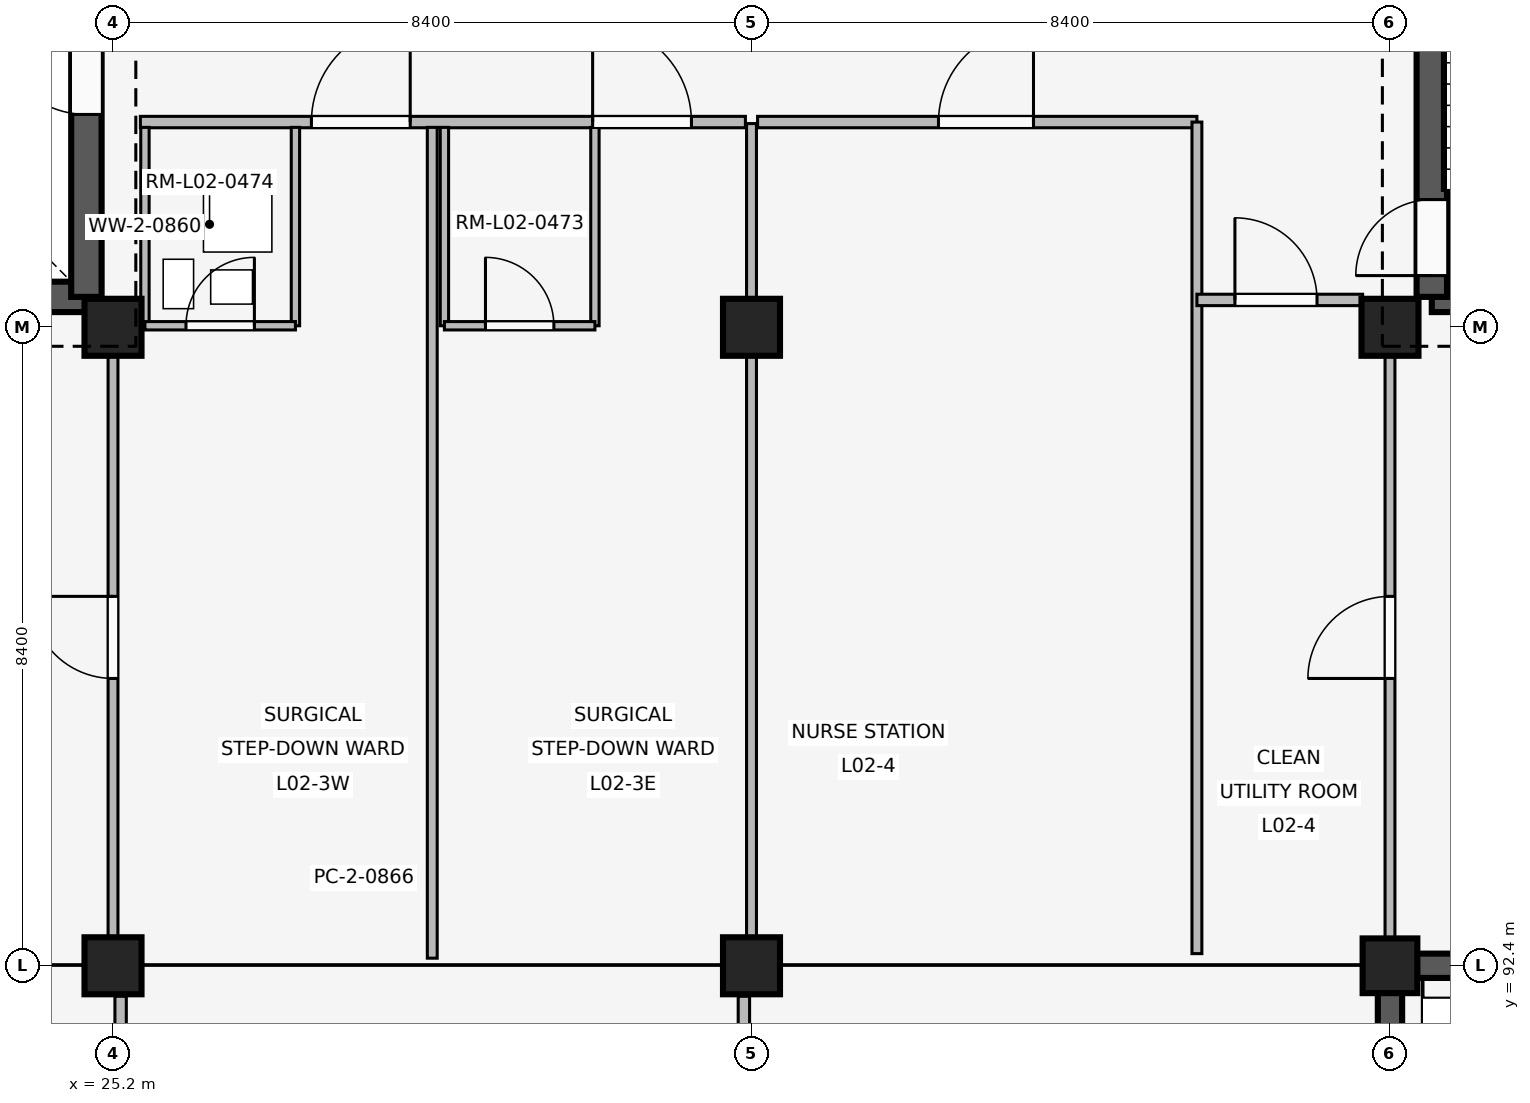
"""IFC4 building model, lengths in metres.
Left out: names, types, materials, properties, quantities, classifications, styles, units other than length and angle.
Written with IfcOpenShell. Run it as: python <this file> out.ifc"""

import sys

from ifc_helpers import new_model, si_unit, direction, frame, frame_2d, origin, origin_2d, place, context, subcontext, project, spatial, rectangle, extrude, element, fill, save


model = new_model("IFC4")
c1 = context("Model", 3, precision=1e-05, world=origin(), true_north=direction((0.0, 1.0)))
c2 = subcontext(c1, "Body", "Model", "MODEL_VIEW")
j1 = project(units=[si_unit("LENGTHUNIT", "METRE"), si_unit("PLANEANGLEUNIT", "RADIAN")], contexts=[c1])
p1 = place(None, origin())
s1 = spatial("IfcSite", under=j1, at=p1, CompositionType="ELEMENT")
p2 = place(p1, origin())
s2 = spatial("IfcBuilding", under=s1, at=p2, CompositionType="ELEMENT")
p3 = place(p2, frame((0.0, 0.0, 8.1)))
s3 = spatial("IfcBuildingStorey", under=s2, at=p3, CompositionType="ELEMENT", Elevation=8.1)
for number, where, z_axis, x_axis in (
    (1, (25.2, 92.4, 0.0), (0.0, 0.0, 1.0), (1.0, 0.0, 0.0)),
    (2, (25.2, 100.8, 0.0), (0.0, 0.0, 1.0), (1.0, 0.0, 0.0)),
    (3, (33.6, 92.4, 0.0), (0.0, 0.0, 1.0), (1.0, 0.0, 0.0)),
    (4, (33.6, 100.8, 0.0), (0.0, 0.0, 1.0), (1.0, 0.0, 0.0)),
):
    element("IfcColumn", number, at=place(p3, frame(where, z_axis=z_axis, x_axis=x_axis)), inside=s3, PredefinedType="COLUMN", context=c2, shape_type="SweptSolid", body=[
        extrude(rectangle(XDim=0.75, YDim=0.75, at=origin_2d()), origin(), (0.0, 0.0, 1.0), 4.8),
    ])
p4 = place(p3, frame((42.0, 92.4, 0.0), z_axis=(0.0, 0.0, 1.0), x_axis=(1.0, 0.0, 0.0)))
e5 = element("IfcColumn", 5, at=p4, inside=s3, PredefinedType="COLUMN", context=c2, shape_type="SweptSolid", body=[
    extrude(rectangle(XDim=0.72, YDim=0.72, at=origin_2d()), origin(), (0.0, 0.0, 1.0), 4.8),
])
p5 = place(p3, frame((42.0, 100.8, 0.0), z_axis=(0.0, 0.0, 1.0), x_axis=(1.0, 0.0, 0.0)))
e6 = element("IfcColumn", 6, at=p5, inside=s3, PredefinedType="COLUMN", context=c2, shape_type="SweptSolid", body=[
    extrude(rectangle(XDim=0.75, YDim=0.75, at=origin_2d()), origin(), (0.0, 0.0, 1.0), 4.8),
])
p6 = place(p3, frame((42.0, 92.045, 0.0), z_axis=(0.0, 0.0, 1.0), x_axis=(0.0, -1.0, 0.0)))
e7 = element("IfcWall", 7, at=p6, inside=s3, PredefinedType="SOLIDWALL", context=c2, shape_type="SweptSolid", body=[
    extrude(rectangle(XDim=7.69, YDim=0.32, at=frame_2d((3.845, 0.0))), origin(), (0.0, 0.0, 1.0), 3.86),
])
p7 = place(p6, frame((1.069, 0.0, 0.85)))
e8 = element("IfcOpeningElement", 8, at=p7, cuts=e7, PredefinedType="OPENING", context=c2, shape_type="SweptSolid", body=[
    extrude(rectangle(XDim=1.4, YDim=1.4, at=frame_2d((0.7, 0.7))), frame((0.0, 0.17, 0.0), z_axis=(0.0, -1.0, 0.0), x_axis=(1.0, 0.0, 0.0)), (0.0, 0.0, 1.0), 0.34),
])
p8 = place(p6, frame((5.221, 0.0, 0.85)))
e9 = element("IfcOpeningElement", 9, at=p8, cuts=e7, PredefinedType="OPENING", context=c2, shape_type="SweptSolid", body=[
    extrude(rectangle(XDim=1.4, YDim=1.4, at=frame_2d((0.7, 0.7))), frame((0.0, 0.17, 0.0), z_axis=(0.0, -1.0, 0.0), x_axis=(1.0, 0.0, 0.0)), (0.0, 0.0, 1.0), 0.34),
])
p9 = place(p3, frame((50.045, 92.4, 0.0), z_axis=(0.0, 0.0, 1.0), x_axis=(-1.0, 0.0, 0.0)))
e10 = element("IfcWall", 10, at=p9, inside=s3, PredefinedType="SOLIDWALL", context=c2, shape_type="SweptSolid", body=[
    extrude(rectangle(XDim=7.69, YDim=0.32, at=frame_2d((3.845, 0.0))), origin(), (0.0, 0.0, 1.0), 3.86),
])
p10 = place(p9, frame((1.089, 0.0, 0.85)))
e11 = element("IfcOpeningElement", 11, at=p10, cuts=e10, PredefinedType="OPENING", context=c2, shape_type="SweptSolid", body=[
    extrude(rectangle(XDim=1.36, YDim=1.42, at=frame_2d((0.68, 0.71))), frame((0.0, 0.17, 0.0), z_axis=(0.0, -1.0, 0.0), x_axis=(1.0, 0.0, 0.0)), (0.0, 0.0, 1.0), 0.34),
])
p11 = place(p9, frame((5.241, 0.0, 0.85)))
e12 = element("IfcOpeningElement", 12, at=p11, cuts=e10, PredefinedType="OPENING", context=c2, shape_type="SweptSolid", body=[
    extrude(rectangle(XDim=1.36, YDim=1.42, at=frame_2d((0.68, 0.71))), frame((0.0, 0.17, 0.0), z_axis=(0.0, -1.0, 0.0), x_axis=(1.0, 0.0, 0.0)), (0.0, 0.0, 1.0), 0.34),
])
p12 = place(p3, frame((42.55, 101.2, 0.0), z_axis=(0.0, 0.0, 1.0), x_axis=(1.0, 0.0, 0.0)))
e13 = element("IfcWall", 13, at=p12, inside=s3, PredefinedType="SHEAR", context=c2, shape_type="SweptSolid", body=[
    extrude(rectangle(XDim=7.5, YDim=0.4, at=frame_2d((3.75, 0.0))), origin(), (0.0, 0.0, 1.0), 4.52),
])
p13 = place(p12, frame((4.85, 0.0, 0.0)))
e14 = element("IfcOpeningElement", 14, at=p13, cuts=e13, PredefinedType="OPENING", context=c2, shape_type="SweptSolid", body=[
    extrude(rectangle(XDim=1.2, YDim=2.2, at=frame_2d((0.6, 1.1))), frame((0.0, 0.21, 0.0), z_axis=(0.0, -1.0, 0.0), x_axis=(1.0, 0.0, 0.0)), (0.0, 0.0, 1.0), 0.42),
])
p14 = place(p3, frame((42.55, 101.2, 0.0), z_axis=(0.0, 0.0, 1.0), x_axis=(0.0, 1.0, 0.0)))
e15 = element("IfcWall", 15, at=p14, inside=s3, PredefinedType="SHEAR", context=c2, shape_type="SweptSolid", body=[
    extrude(rectangle(XDim=7.55, YDim=0.4, at=frame_2d((3.775, 0.0))), origin(), (0.0, 0.0, 1.0), 4.52),
])
p15 = place(p14, frame((0.28, 0.0, 0.0)))
e16 = element("IfcOpeningElement", 16, at=p15, cuts=e15, PredefinedType="OPENING", context=c2, shape_type="SweptSolid", body=[
    extrude(rectangle(XDim=1.0, YDim=2.15, at=frame_2d((0.5, 1.075))), frame((0.0, 0.21, 0.0), z_axis=(0.0, -1.0, 0.0), x_axis=(1.0, 0.0, 0.0)), (0.0, 0.0, 1.0), 0.42),
])
p16 = place(p3, frame((17.35, 101.2, 0.0), z_axis=(0.0, 0.0, 1.0), x_axis=(1.0, 0.0, 0.0)))
e17 = element("IfcWall", 17, at=p16, inside=s3, PredefinedType="SHEAR", context=c2, shape_type="SweptSolid", body=[
    extrude(rectangle(XDim=7.5, YDim=0.4, at=frame_2d((3.75, 0.0))), origin(), (0.0, 0.0, 1.0), 4.52),
])
p17 = place(p16, frame((4.85, 0.0, 0.0)))
e18 = element("IfcOpeningElement", 18, at=p17, cuts=e17, PredefinedType="OPENING", context=c2, shape_type="SweptSolid", body=[
    extrude(rectangle(XDim=1.2, YDim=2.2, at=frame_2d((0.6, 1.1))), frame((0.0, 0.21, 0.0), z_axis=(0.0, -1.0, 0.0), x_axis=(1.0, 0.0, 0.0)), (0.0, 0.0, 1.0), 0.42),
])
p18 = place(p3, frame((24.85, 101.2, 0.0), z_axis=(0.0, 0.0, 1.0), x_axis=(0.0, 1.0, 0.0)))
e19 = element("IfcWall", 19, at=p18, inside=s3, PredefinedType="SHEAR", context=c2, shape_type="SweptSolid", body=[
    extrude(rectangle(XDim=7.55, YDim=0.4, at=frame_2d((3.775, 0.0))), origin(), (0.0, 0.0, 1.0), 4.52),
])
p19 = place(p18, frame((2.4, 0.0, 0.0)))
e20 = element("IfcOpeningElement", 20, at=p19, cuts=e19, PredefinedType="OPENING", context=c2, shape_type="SweptSolid", body=[
    extrude(rectangle(XDim=1.2, YDim=2.2, at=frame_2d((0.6, 1.1))), frame((0.0, 0.21, 0.0), z_axis=(0.0, -1.0, 0.0), x_axis=(1.0, 0.0, 0.0)), (0.0, 0.0, 1.0), 0.42),
])
p20 = place(p3, frame((25.2, 92.54, 0.0), z_axis=(0.0, 0.0, 1.0), x_axis=(0.0, 1.0, 0.0)))
e21 = element("IfcWall", 21, at=p20, inside=s3, PredefinedType="PARTITIONING", context=c2, shape_type="SweptSolid", body=[
    extrude(rectangle(XDim=8.21, YDim=0.13, at=frame_2d((4.105, 0.0))), origin(), (0.0, 0.0, 1.0), 3.84),
])
p21 = place(p20, frame((3.64, 0.0, 0.0)))
e22 = element("IfcOpeningElement", 22, at=p21, cuts=e21, PredefinedType="OPENING", context=c2, shape_type="SweptSolid", body=[
    extrude(rectangle(XDim=1.08, YDim=2.15, at=frame_2d((0.54, 1.075))), frame((0.0, 0.075, 0.0), z_axis=(0.0, -1.0, 0.0), x_axis=(1.0, 0.0, 0.0)), (0.0, 0.0, 1.0), 0.15),
])
p22 = place(p3, frame((25.56, 103.5, 0.0), z_axis=(0.0, 0.0, 1.0), x_axis=(1.0, 0.0, 0.0)))
e23 = element("IfcWall", 23, at=p22, inside=s3, PredefinedType="PARTITIONING", context=c2, shape_type="SweptSolid", body=[
    extrude(rectangle(XDim=7.96, YDim=0.15, at=frame_2d((3.98, 0.0))), origin(), (0.0, 0.0, 1.0), 3.84),
])
p23 = place(p22, frame((2.25, 0.0, 0.0)))
e24 = element("IfcOpeningElement", 24, at=p23, cuts=e23, PredefinedType="OPENING", context=c2, shape_type="SweptSolid", body=[
    extrude(rectangle(XDim=1.3, YDim=2.25, at=frame_2d((0.65, 1.125))), frame((0.0, 0.085, 0.0), z_axis=(0.0, -1.0, 0.0), x_axis=(1.0, 0.0, 0.0)), (0.0, 0.0, 1.0), 0.17),
])
p24 = place(p22, frame((5.95, 0.0, 0.0)))
e25 = element("IfcOpeningElement", 25, at=p24, cuts=e23, PredefinedType="OPENING", context=c2, shape_type="SweptSolid", body=[
    extrude(rectangle(XDim=1.3, YDim=2.25, at=frame_2d((0.65, 1.125))), frame((0.0, 0.085, 0.0), z_axis=(0.0, -1.0, 0.0), x_axis=(1.0, 0.0, 0.0)), (0.0, 0.0, 1.0), 0.17),
])
p25 = place(p3, frame((29.4, 92.5, 0.0), z_axis=(0.0, 0.0, 1.0), x_axis=(0.0, 1.0, 0.0)))
e26 = element("IfcWall", 26, at=p25, inside=s3, PredefinedType="PARTITIONING", context=c2, shape_type="SweptSolid", body=[
    extrude(rectangle(XDim=10.93, YDim=0.13, at=frame_2d((5.465, 0.0))), origin(), (0.0, 0.0, 1.0), 3.84),
])
for number, where, z_axis, x_axis in (
    (27, (25.62, 100.82, 0.0), (0.0, 0.0, 1.0), (0.0, 1.0, 0.0)),
    (28, (27.6, 100.82, 0.0), (0.0, 0.0, 1.0), (0.0, 1.0, 0.0)),
):
    element("IfcWall", number, at=place(p3, frame(where, z_axis=z_axis, x_axis=x_axis)), inside=s3, PredefinedType="PARTITIONING", context=c2, shape_type="SweptSolid", body=[
        extrude(rectangle(XDim=2.61, YDim=0.11, at=frame_2d((1.305, 0.0))), origin(), (0.0, 0.0, 1.0), 3.84),
    ])
p26 = place(p3, frame((25.62, 100.82, 0.0), z_axis=(0.0, 0.0, 1.0), x_axis=(1.0, 0.0, 0.0)))
e29 = element("IfcWall", 29, at=p26, inside=s3, PredefinedType="PARTITIONING", context=c2, shape_type="SweptSolid", body=[
    extrude(rectangle(XDim=1.98, YDim=0.11, at=frame_2d((0.99, 0.0))), origin(), (0.0, 0.0, 1.0), 3.84),
])
p27 = place(p26, frame((0.54, 0.0, 0.0)))
e30 = element("IfcOpeningElement", 30, at=p27, cuts=e29, PredefinedType="OPENING", context=c2, shape_type="SweptSolid", body=[
    extrude(rectangle(XDim=0.9, YDim=2.1, at=frame_2d((0.45, 1.05))), frame((0.0, 0.065, 0.0), z_axis=(0.0, -1.0, 0.0), x_axis=(1.0, 0.0, 0.0)), (0.0, 0.0, 1.0), 0.13),
])
for number, where, z_axis, x_axis in (
    (31, (29.56, 100.82, 0.0), (0.0, 0.0, 1.0), (0.0, 1.0, 0.0)),
    (32, (31.54, 100.82, 0.0), (0.0, 0.0, 1.0), (0.0, 1.0, 0.0)),
):
    element("IfcWall", number, at=place(p3, frame(where, z_axis=z_axis, x_axis=x_axis)), inside=s3, PredefinedType="PARTITIONING", context=c2, shape_type="SweptSolid", body=[
        extrude(rectangle(XDim=2.61, YDim=0.11, at=frame_2d((1.305, 0.0))), origin(), (0.0, 0.0, 1.0), 3.84),
    ])
p28 = place(p3, frame((29.56, 100.82, 0.0), z_axis=(0.0, 0.0, 1.0), x_axis=(1.0, 0.0, 0.0)))
e33 = element("IfcWall", 33, at=p28, inside=s3, PredefinedType="PARTITIONING", context=c2, shape_type="SweptSolid", body=[
    extrude(rectangle(XDim=1.98, YDim=0.11, at=frame_2d((0.99, 0.0))), origin(), (0.0, 0.0, 1.0), 3.84),
])
p29 = place(p28, frame((0.54, 0.0, 0.0)))
e34 = element("IfcOpeningElement", 34, at=p29, cuts=e33, PredefinedType="OPENING", context=c2, shape_type="SweptSolid", body=[
    extrude(rectangle(XDim=0.9, YDim=2.1, at=frame_2d((0.45, 1.05))), frame((0.0, 0.065, 0.0), z_axis=(0.0, -1.0, 0.0), x_axis=(1.0, 0.0, 0.0)), (0.0, 0.0, 1.0), 0.13),
])
p30 = place(p3, frame((28.05, 93.55, 0.0), z_axis=(0.0, 0.0, 1.0), x_axis=(1.0, 0.0, 0.0)))
e35 = element("IfcWall", 35, at=p30, inside=s3, PredefinedType="PLUMBINGWALL", context=c2, shape_type="SweptSolid", body=[
    extrude(rectangle(XDim=0.9, YDim=0.24, at=frame_2d((0.45, 0.0))), origin(), (0.0, 0.0, 1.0), 3.84),
])
p31 = place(p3, frame((33.6, 92.54, 0.0), z_axis=(0.0, 0.0, 1.0), x_axis=(0.0, 1.0, 0.0)))
e36 = element("IfcWall", 36, at=p31, inside=s3, PredefinedType="PARTITIONING", context=c2, shape_type="SweptSolid", body=[
    extrude(rectangle(XDim=10.94, YDim=0.13, at=frame_2d((5.47, 0.0))), origin(), (0.0, 0.0, 1.0), 3.84),
])
p32 = place(p3, frame((33.68, 103.5, 0.0), z_axis=(0.0, 0.0, 1.0), x_axis=(1.0, 0.0, 0.0)))
e37 = element("IfcWall", 37, at=p32, inside=s3, PredefinedType="PARTITIONING", context=c2, shape_type="SweptSolid", body=[
    extrude(rectangle(XDim=5.78, YDim=0.15, at=frame_2d((2.89, 0.0))), origin(), (0.0, 0.0, 1.0), 3.84),
])
p33 = place(p32, frame((2.38, 0.0, 0.0)))
e38 = element("IfcOpeningElement", 38, at=p33, cuts=e37, PredefinedType="OPENING", context=c2, shape_type="SweptSolid", body=[
    extrude(rectangle(XDim=1.25, YDim=2.2, at=frame_2d((0.625, 1.1))), frame((0.0, 0.085, 0.0), z_axis=(0.0, -1.0, 0.0), x_axis=(1.0, 0.0, 0.0)), (0.0, 0.0, 1.0), 0.17),
])
p34 = place(p3, frame((39.46, 92.56, 0.0), z_axis=(0.0, 0.0, 1.0), x_axis=(0.0, 1.0, 0.0)))
e39 = element("IfcWall", 39, at=p34, inside=s3, PredefinedType="PARTITIONING", context=c2, shape_type="SweptSolid", body=[
    extrude(rectangle(XDim=10.94, YDim=0.13, at=frame_2d((5.47, 0.0))), origin(), (0.0, 0.0, 1.0), 3.84),
])
p35 = place(p3, frame((39.46, 101.16, 0.0), z_axis=(0.0, 0.0, 1.0), x_axis=(1.0, 0.0, 0.0)))
e40 = element("IfcWall", 40, at=p35, inside=s3, PredefinedType="PARTITIONING", context=c2, shape_type="SweptSolid", body=[
    extrude(rectangle(XDim=2.18, YDim=0.15, at=frame_2d((1.09, 0.0))), origin(), (0.0, 0.0, 1.0), 3.84),
])
p36 = place(p35, frame((0.5, 0.0, 0.0)))
e41 = element("IfcOpeningElement", 41, at=p36, cuts=e40, PredefinedType="OPENING", context=c2, shape_type="SweptSolid", body=[
    extrude(rectangle(XDim=1.08, YDim=2.15, at=frame_2d((0.54, 1.075))), frame((0.0, 0.085, 0.0), z_axis=(0.0, -1.0, 0.0), x_axis=(1.0, 0.0, 0.0)), (0.0, 0.0, 1.0), 0.17),
])
p37 = place(p3, frame((42.0, 92.54, 0.0), z_axis=(0.0, 0.0, 1.0), x_axis=(0.0, 1.0, 0.0)))
e42 = element("IfcWall", 42, at=p37, inside=s3, PredefinedType="PARTITIONING", context=c2, shape_type="SweptSolid", body=[
    extrude(rectangle(XDim=8.21, YDim=0.13, at=frame_2d((4.105, 0.0))), origin(), (0.0, 0.0, 1.0), 3.84),
])
p38 = place(p37, frame((3.64, 0.0, 0.0)))
e43 = element("IfcOpeningElement", 43, at=p38, cuts=e42, PredefinedType="OPENING", context=c2, shape_type="SweptSolid", body=[
    extrude(rectangle(XDim=1.08, YDim=2.15, at=frame_2d((0.54, 1.075))), frame((0.0, 0.075, 0.0), z_axis=(0.0, -1.0, 0.0), x_axis=(1.0, 0.0, 0.0)), (0.0, 0.0, 1.0), 0.15),
])
p39 = place(p3, frame((25.3, 76.0, 0.0), z_axis=(0.0, 0.0, 1.0), x_axis=(0.0, 1.0, 0.0)))
e44 = element("IfcWall", 44, at=p39, inside=s3, PredefinedType="PARTITIONING", context=c2, shape_type="SweptSolid", body=[
    extrude(rectangle(XDim=16.0, YDim=0.15, at=frame_2d((8.0, 0.0))), origin(), (0.0, 0.0, 1.0), 3.84),
])
p40 = place(p39, frame((3.4, 0.0, 0.0)))
e45 = element("IfcOpeningElement", 45, at=p40, cuts=e44, PredefinedType="OPENING", context=c2, shape_type="SweptSolid", body=[
    extrude(rectangle(XDim=1.5, YDim=2.3, at=frame_2d((0.75, 1.15))), frame((0.0, 0.085, 0.0), z_axis=(0.0, -1.0, 0.0), x_axis=(1.0, 0.0, 0.0)), (0.0, 0.0, 1.0), 0.17),
])
p41 = place(p3, frame((33.5, 59.2, 0.0), z_axis=(0.0, 0.0, 1.0), x_axis=(0.0, 1.0, 0.0)))
e46 = element("IfcWall", 46, at=p41, inside=s3, PredefinedType="PARTITIONING", context=c2, shape_type="SweptSolid", body=[
    extrude(rectangle(XDim=32.8, YDim=0.15, at=frame_2d((16.4, 0.0))), origin(), (0.0, 0.0, 1.0), 3.84),
])
p42 = place(p41, frame((3.4, 0.0, 0.0)))
e47 = element("IfcOpeningElement", 47, at=p42, cuts=e46, PredefinedType="OPENING", context=c2, shape_type="SweptSolid", body=[
    extrude(rectangle(XDim=1.5, YDim=2.3, at=frame_2d((0.75, 1.15))), frame((0.0, 0.085, 0.0), z_axis=(0.0, -1.0, 0.0), x_axis=(1.0, 0.0, 0.0)), (0.0, 0.0, 1.0), 0.17),
])
p43 = place(p15, origin())
e48 = element("IfcDoor", 48, at=p43, inside=s3, OperationType="SINGLE_SWING_LEFT", PredefinedType="DOOR", context=c2, shape_type="SweptSolid", body=[
    extrude(rectangle(XDim=1.0, YDim=2.15, at=frame_2d((0.5, 1.075))), frame((0.0, 0.025, 0.0), z_axis=(0.0, -1.0, 0.0), x_axis=(1.0, 0.0, 0.0)), (0.0, 0.0, 1.0), 0.05),
])
fill(e16, e48)
p44 = place(p19, origin())
e49 = element("IfcDoor", 49, at=p44, inside=s3, OperationType="SINGLE_SWING_RIGHT", PredefinedType="DOOR", context=c2, shape_type="SweptSolid", body=[
    extrude(rectangle(XDim=1.2, YDim=2.2, at=frame_2d((0.6, 1.1))), frame((0.0, 0.025, 0.0), z_axis=(0.0, -1.0, 0.0), x_axis=(1.0, 0.0, 0.0)), (0.0, 0.0, 1.0), 0.05),
])
fill(e20, e49)
p45 = place(p21, origin())
e50 = element("IfcDoor", 50, at=p45, inside=s3, OperationType="SINGLE_SWING_RIGHT", PredefinedType="DOOR", context=c2, shape_type="SweptSolid", body=[
    extrude(rectangle(XDim=1.08, YDim=2.15, at=frame_2d((0.54, 1.075))), frame((0.0, 0.025, 0.0), z_axis=(0.0, -1.0, 0.0), x_axis=(1.0, 0.0, 0.0)), (0.0, 0.0, 1.0), 0.05),
])
fill(e22, e50)
p46 = place(p23, origin())
e51 = element("IfcDoor", 51, at=p46, inside=s3, OperationType="SINGLE_SWING_RIGHT", PredefinedType="DOOR", context=c2, shape_type="SweptSolid", body=[
    extrude(rectangle(XDim=1.3, YDim=2.25, at=frame_2d((0.65, 1.125))), frame((0.0, 0.025, 0.0), z_axis=(0.0, -1.0, 0.0), x_axis=(1.0, 0.0, 0.0)), (0.0, 0.0, 1.0), 0.05),
])
fill(e24, e51)
p47 = place(p24, origin())
e52 = element("IfcDoor", 52, at=p47, inside=s3, OperationType="SINGLE_SWING_LEFT", PredefinedType="DOOR", context=c2, shape_type="SweptSolid", body=[
    extrude(rectangle(XDim=1.3, YDim=2.25, at=frame_2d((0.65, 1.125))), frame((0.0, 0.025, 0.0), z_axis=(0.0, -1.0, 0.0), x_axis=(1.0, 0.0, 0.0)), (0.0, 0.0, 1.0), 0.05),
])
fill(e25, e52)
p48 = place(p27, origin())
e53 = element("IfcDoor", 53, at=p48, inside=s3, OperationType="SINGLE_SWING_RIGHT", PredefinedType="DOOR", context=c2, shape_type="SweptSolid", body=[
    extrude(rectangle(XDim=0.9, YDim=2.1, at=frame_2d((0.45, 1.05))), frame((0.0, 0.025, 0.0), z_axis=(0.0, -1.0, 0.0), x_axis=(1.0, 0.0, 0.0)), (0.0, 0.0, 1.0), 0.05),
])
fill(e30, e53)
p49 = place(p29, origin())
e54 = element("IfcDoor", 54, at=p49, inside=s3, OperationType="SINGLE_SWING_LEFT", PredefinedType="DOOR", context=c2, shape_type="SweptSolid", body=[
    extrude(rectangle(XDim=0.9, YDim=2.1, at=frame_2d((0.45, 1.05))), frame((0.0, 0.025, 0.0), z_axis=(0.0, -1.0, 0.0), x_axis=(1.0, 0.0, 0.0)), (0.0, 0.0, 1.0), 0.05),
])
fill(e34, e54)
p50 = place(p33, origin())
e55 = element("IfcDoor", 55, at=p50, inside=s3, OperationType="SINGLE_SWING_RIGHT", PredefinedType="DOOR", context=c2, shape_type="SweptSolid", body=[
    extrude(rectangle(XDim=1.25, YDim=2.2, at=frame_2d((0.625, 1.1))), frame((0.0, 0.025, 0.0), z_axis=(0.0, -1.0, 0.0), x_axis=(1.0, 0.0, 0.0)), (0.0, 0.0, 1.0), 0.05),
])
fill(e38, e55)
p51 = place(p36, origin())
e56 = element("IfcDoor", 56, at=p51, inside=s3, OperationType="SINGLE_SWING_LEFT", PredefinedType="DOOR", context=c2, shape_type="SweptSolid", body=[
    extrude(rectangle(XDim=1.08, YDim=2.15, at=frame_2d((0.54, 1.075))), frame((0.0, 0.025, 0.0), z_axis=(0.0, -1.0, 0.0), x_axis=(1.0, 0.0, 0.0)), (0.0, 0.0, 1.0), 0.05),
])
fill(e41, e56)
p52 = place(p38, origin())
e57 = element("IfcDoor", 57, at=p52, inside=s3, OperationType="SINGLE_SWING_LEFT", PredefinedType="DOOR", context=c2, shape_type="SweptSolid", body=[
    extrude(rectangle(XDim=1.08, YDim=2.15, at=frame_2d((0.54, 1.075))), frame((0.0, 0.025, 0.0), z_axis=(0.0, -1.0, 0.0), x_axis=(1.0, 0.0, 0.0)), (0.0, 0.0, 1.0), 0.05),
])
fill(e43, e57)
save(model, sys.argv[1])
